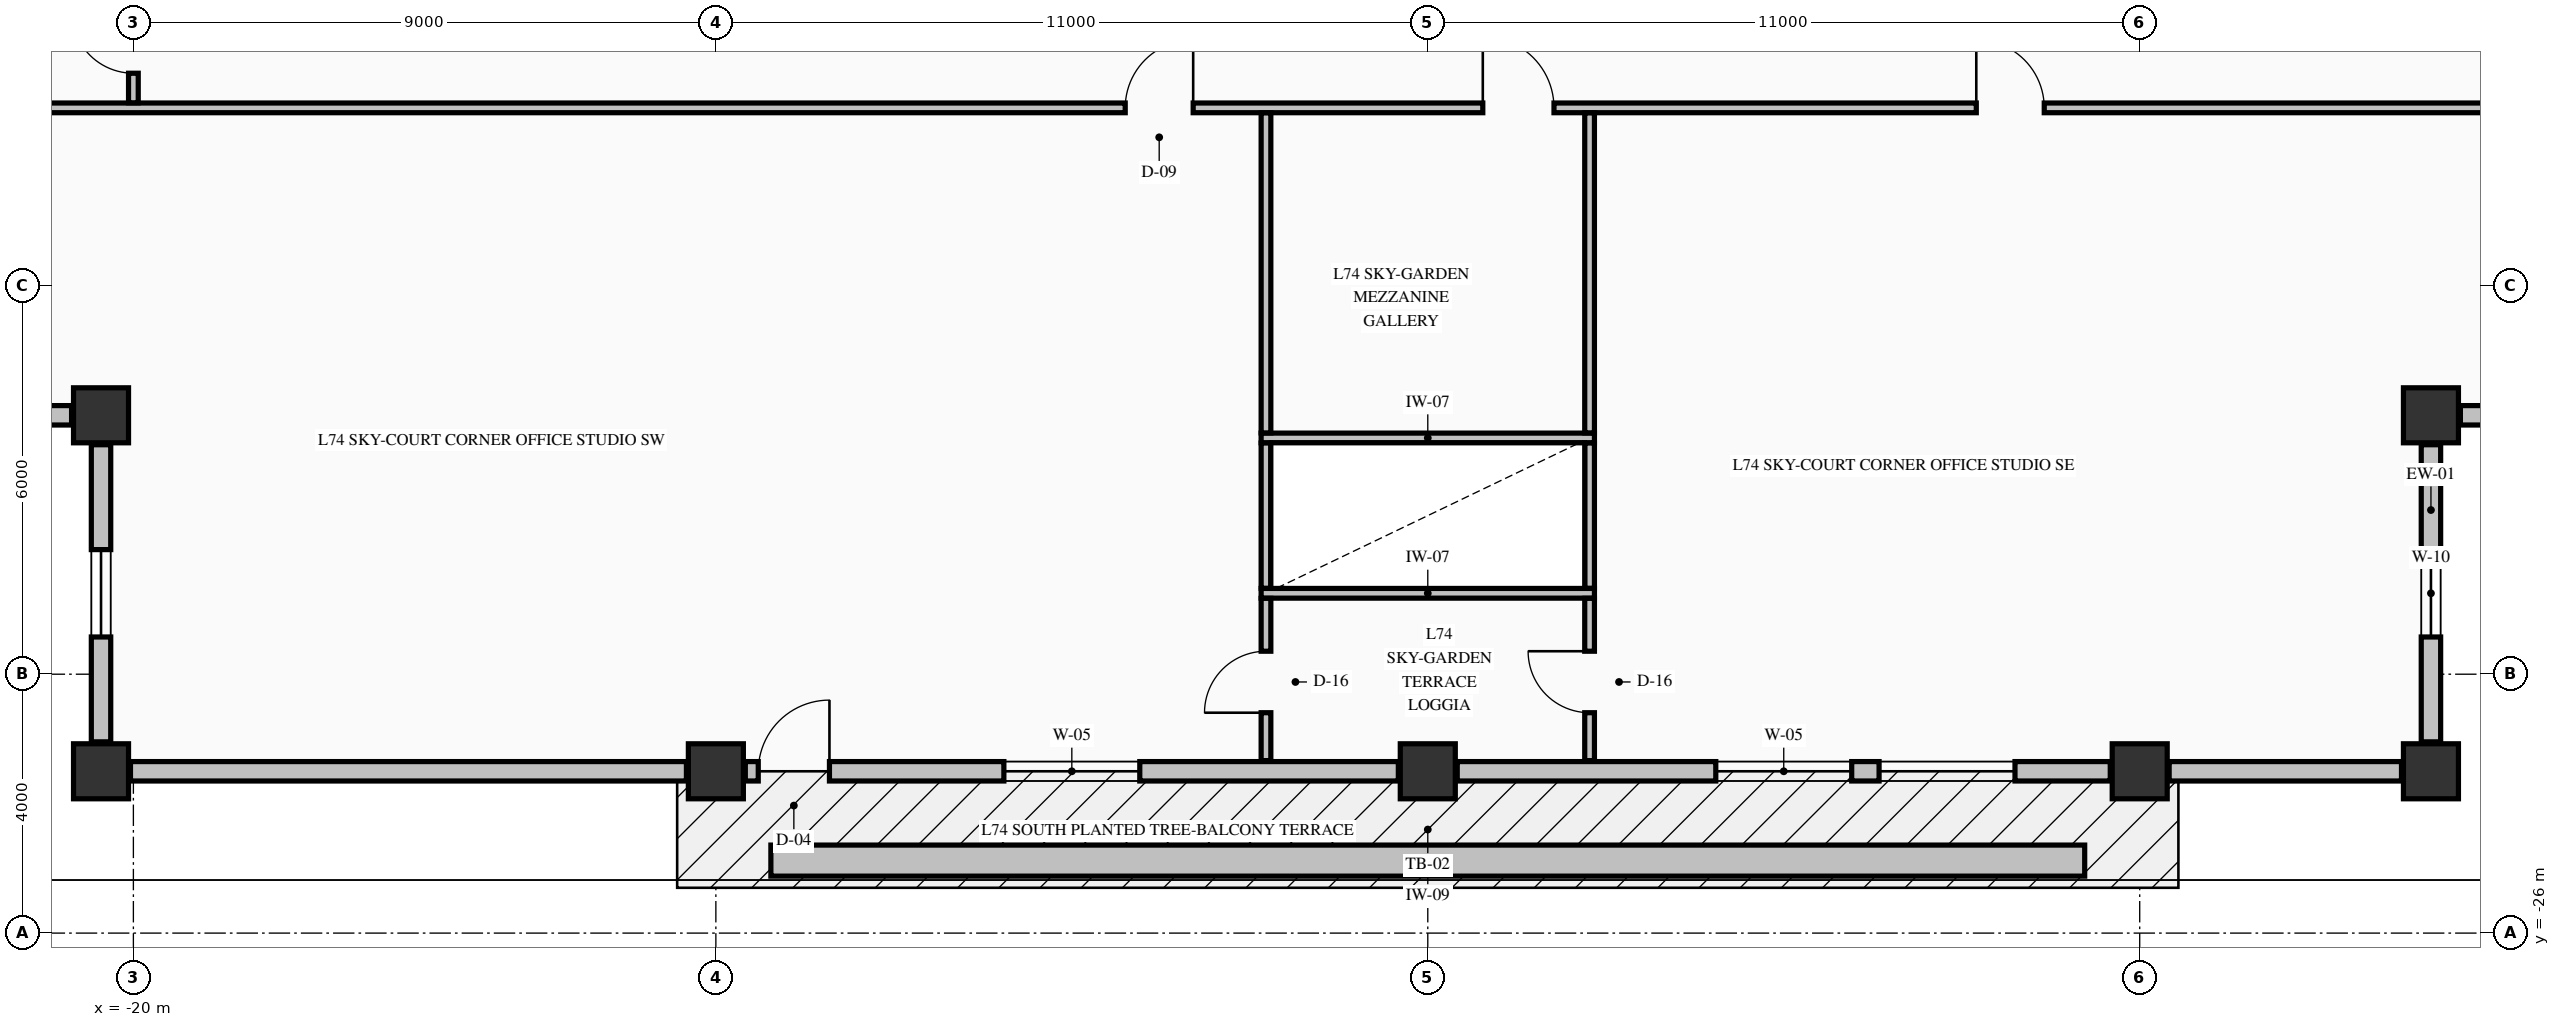
"""IFC4 building model, lengths in metres.
Left out: names, types, materials, properties, quantities, classifications, styles, units other than length and angle.
Written with IfcOpenShell. Run it as: python <this file> out.ifc"""

import sys

from ifc_helpers import new_model, si_unit, direction, frame, frame_2d, origin, origin_2d, place, context, subcontext, project, spatial, rectangle, extrude, element, fill, save


model = new_model("IFC4")
c1 = context("Model", 3, precision=1e-05, world=origin(), true_north=direction((0.0, 1.0)))
c2 = subcontext(c1, "Body", "Model", "MODEL_VIEW")
j1 = project(units=[si_unit("LENGTHUNIT", "METRE"), si_unit("PLANEANGLEUNIT", "RADIAN")], contexts=[c1])
p1 = place(None, origin())
s1 = spatial("IfcSite", under=j1, at=p1, CompositionType="ELEMENT")
p2 = place(p1, origin())
s2 = spatial("IfcBuilding", under=s1, at=p2, CompositionType="ELEMENT")
p3 = place(p2, frame((0.0, 0.0, 278.06)))
s3 = spatial("IfcBuildingStorey", under=s2, at=p3, CompositionType="ELEMENT", Elevation=278.06)
for number, where, z_axis, x_axis in (
    (1, (-20.5, -23.5, -0.425), (0.0, 0.0, 1.0), (1.0, 0.0, 0.0)),
    (2, (-11.0, -23.5, -0.425), (0.0, 0.0, 1.0), (1.0, 0.0, 0.0)),
    (3, (0.0, -23.5, -0.425), (0.0, 0.0, 1.0), (1.0, 0.0, 0.0)),
    (4, (11.0, -23.5, -0.425), (0.0, 0.0, 1.0), (1.0, 0.0, 0.0)),
    (5, (15.5, -23.5, -0.425), (0.0, 0.0, 1.0), (1.0, 0.0, 0.0)),
    (6, (-20.5, -18.0, -0.425), (0.0, 0.0, 1.0), (1.0, 0.0, 0.0)),
    (7, (15.5, -18.0, -0.425), (0.0, 0.0, 1.0), (1.0, 0.0, 0.0)),
):
    element("IfcColumn", number, at=place(p3, frame(where, z_axis=z_axis, x_axis=x_axis)), inside=s3, PredefinedType="COLUMN", context=c2, shape_type="SweptSolid", body=[
        extrude(rectangle(XDim=0.85, YDim=0.85, at=origin_2d()), origin(), (0.0, 0.0, 1.0), 3.84),
    ])
p4 = place(p3, frame((15.5, -23.045, 0.0), z_axis=(0.0, 0.0, 1.0), x_axis=(0.0, 1.0, 0.0)))
e8 = element("IfcWall", 8, at=p4, inside=s3, PredefinedType="STANDARD", context=c2, shape_type="SweptSolid", body=[
    extrude(rectangle(XDim=4.59, YDim=0.3, at=frame_2d((2.295, 0.0))), origin(), (0.0, 0.0, 1.0), 2.807),
])
p5 = place(p4, frame((1.62, 0.0, 0.68)))
e9 = element("IfcOpeningElement", 9, at=p5, cuts=e8, PredefinedType="OPENING", context=c2, shape_type="SweptSolid", body=[
    extrude(rectangle(XDim=1.35, YDim=1.42, at=frame_2d((0.675, 0.71))), frame((0.0, 0.16, 0.0), z_axis=(0.0, -1.0, 0.0), x_axis=(1.0, 0.0, 0.0)), (0.0, 0.0, 1.0), 0.32),
])
p6 = place(p3, frame((15.955, -18.0, 0.0), z_axis=(0.0, 0.0, 1.0), x_axis=(1.0, 0.0, 0.0)))
e10 = element("IfcWall", 10, at=p6, inside=s3, PredefinedType="STANDARD", context=c2, shape_type="SweptSolid", body=[
    extrude(rectangle(XDim=4.59, YDim=0.3, at=frame_2d((2.295, 0.0))), origin(), (0.0, 0.0, 1.0), 2.807),
])
p7 = place(p6, frame((1.62, 0.0, 0.68)))
e11 = element("IfcOpeningElement", 11, at=p7, cuts=e10, PredefinedType="OPENING", context=c2, shape_type="SweptSolid", body=[
    extrude(rectangle(XDim=1.35, YDim=1.42, at=frame_2d((0.675, 0.71))), frame((0.0, 0.16, 0.0), z_axis=(0.0, -1.0, 0.0), x_axis=(1.0, 0.0, 0.0)), (0.0, 0.0, 1.0), 0.32),
])
p8 = place(p3, frame((-25.545, -18.0, 0.0), z_axis=(0.0, 0.0, 1.0), x_axis=(1.0, 0.0, 0.0)))
e12 = element("IfcWall", 12, at=p8, inside=s3, PredefinedType="STANDARD", context=c2, shape_type="SweptSolid", body=[
    extrude(rectangle(XDim=4.59, YDim=0.3, at=frame_2d((2.295, 0.0))), origin(), (0.0, 0.0, 1.0), 2.807),
])
p9 = place(p8, frame((1.62, 0.0, 0.68)))
e13 = element("IfcOpeningElement", 13, at=p9, cuts=e12, PredefinedType="OPENING", context=c2, shape_type="SweptSolid", body=[
    extrude(rectangle(XDim=1.35, YDim=1.42, at=frame_2d((0.675, 0.71))), frame((0.0, 0.16, 0.0), z_axis=(0.0, -1.0, 0.0), x_axis=(1.0, 0.0, 0.0)), (0.0, 0.0, 1.0), 0.32),
])
p10 = place(p3, frame((-20.5, -18.455, 0.0), z_axis=(0.0, 0.0, 1.0), x_axis=(0.0, -1.0, 0.0)))
e14 = element("IfcWall", 14, at=p10, inside=s3, PredefinedType="STANDARD", context=c2, shape_type="SweptSolid", body=[
    extrude(rectangle(XDim=4.59, YDim=0.3, at=frame_2d((2.295, 0.0))), origin(), (0.0, 0.0, 1.0), 2.807),
])
p11 = place(p10, frame((1.62, 0.0, 0.68)))
e15 = element("IfcOpeningElement", 15, at=p11, cuts=e14, PredefinedType="OPENING", context=c2, shape_type="SweptSolid", body=[
    extrude(rectangle(XDim=1.35, YDim=1.42, at=frame_2d((0.675, 0.71))), frame((0.0, 0.16, 0.0), z_axis=(0.0, -1.0, 0.0), x_axis=(1.0, 0.0, 0.0)), (0.0, 0.0, 1.0), 0.32),
])
p12 = place(p3, frame((-20.045, -23.5, 0.0), z_axis=(0.0, 0.0, 1.0), x_axis=(1.0, 0.0, 0.0)))
e16 = element("IfcWall", 16, at=p12, inside=s3, PredefinedType="STANDARD", context=c2, shape_type="SweptSolid", body=[
    extrude(rectangle(XDim=8.59, YDim=0.3, at=frame_2d((4.295, 0.0))), origin(), (0.0, 0.0, 1.0), 2.807),
])
p13 = place(p3, frame((-10.545, -23.5, 0.0), z_axis=(0.0, 0.0, 1.0), x_axis=(1.0, 0.0, 0.0)))
e17 = element("IfcWall", 17, at=p13, inside=s3, PredefinedType="STANDARD", context=c2, shape_type="SweptSolid", body=[
    extrude(rectangle(XDim=10.09, YDim=0.3, at=frame_2d((5.045, 0.0))), origin(), (0.0, 0.0, 1.0), 2.807),
])
p14 = place(p13, frame((0.2, 0.0, 0.0)))
e18 = element("IfcOpeningElement", 18, at=p14, cuts=e17, PredefinedType="OPENING", context=c2, shape_type="SweptSolid", body=[
    extrude(rectangle(XDim=1.1, YDim=2.15, at=frame_2d((0.55, 1.075))), frame((0.0, 0.16, 0.0), z_axis=(0.0, -1.0, 0.0), x_axis=(1.0, 0.0, 0.0)), (0.0, 0.0, 1.0), 0.32),
])
p15 = place(p13, frame((3.995, 0.0, 0.7)))
e19 = element("IfcOpeningElement", 19, at=p15, cuts=e17, PredefinedType="OPENING", context=c2, shape_type="SweptSolid", body=[
    extrude(rectangle(XDim=2.1, YDim=1.5, at=frame_2d((1.05, 0.75))), frame((0.0, 0.16, 0.0), z_axis=(0.0, -1.0, 0.0), x_axis=(1.0, 0.0, 0.0)), (0.0, 0.0, 1.0), 0.32),
])
p16 = place(p3, frame((0.455, -23.5, 0.0), z_axis=(0.0, 0.0, 1.0), x_axis=(1.0, 0.0, 0.0)))
e20 = element("IfcWall", 20, at=p16, inside=s3, PredefinedType="STANDARD", context=c2, shape_type="SweptSolid", body=[
    extrude(rectangle(XDim=10.09, YDim=0.3, at=frame_2d((5.045, 0.0))), origin(), (0.0, 0.0, 1.0), 2.807),
])
p17 = place(p16, frame((3.995, 0.0, 0.7)))
e21 = element("IfcOpeningElement", 21, at=p17, cuts=e20, PredefinedType="OPENING", context=c2, shape_type="SweptSolid", body=[
    extrude(rectangle(XDim=2.1, YDim=1.5, at=frame_2d((1.05, 0.75))), frame((0.0, 0.16, 0.0), z_axis=(0.0, -1.0, 0.0), x_axis=(1.0, 0.0, 0.0)), (0.0, 0.0, 1.0), 0.32),
])
p18 = place(p16, frame((6.518, 0.0, 0.7)))
e22 = element("IfcOpeningElement", 22, at=p18, cuts=e20, PredefinedType="OPENING", context=c2, shape_type="SweptSolid", body=[
    extrude(rectangle(XDim=2.1, YDim=1.5, at=frame_2d((1.05, 0.75))), frame((0.0, 0.16, 0.0), z_axis=(0.0, -1.0, 0.0), x_axis=(1.0, 0.0, 0.0)), (0.0, 0.0, 1.0), 0.32),
])
p19 = place(p3, frame((11.455, -23.5, 0.0), z_axis=(0.0, 0.0, 1.0), x_axis=(1.0, 0.0, 0.0)))
e23 = element("IfcWall", 23, at=p19, inside=s3, PredefinedType="STANDARD", context=c2, shape_type="SweptSolid", body=[
    extrude(rectangle(XDim=3.59, YDim=0.3, at=frame_2d((1.795, 0.0))), origin(), (0.0, 0.0, 1.0), 2.807),
])
for number, where, z_axis, x_axis in (
    (24, (-2.575, -20.75, 0.0), (0.0, 0.0, 1.0), (1.0, 0.0, 0.0)),
    (25, (-2.575, -18.35, 0.0), (0.0, 0.0, 1.0), (1.0, 0.0, 0.0)),
):
    element("IfcWall", number, at=place(p3, frame(where, z_axis=z_axis, x_axis=x_axis)), inside=s3, PredefinedType="PARTITIONING", context=c2, shape_type="SweptSolid", body=[
        extrude(rectangle(XDim=5.15, YDim=0.15, at=frame_2d((2.575, 0.0))), origin(), (0.0, 0.0, 1.0), 3.415),
    ])
p20 = place(p3, frame((-25.835, -13.25, 0.0), z_axis=(0.0, 0.0, 1.0), x_axis=(1.0, 0.0, 0.0)))
e26 = element("IfcWall", 26, at=p20, inside=s3, PredefinedType="PARTITIONING", context=c2, shape_type="SweptSolid", body=[
    extrude(rectangle(XDim=45.91, YDim=0.15, at=frame_2d((22.955, 0.0))), origin(), (0.0, 0.0, 1.0), 3.415),
])
p21 = place(p20, frame((26.685, 0.0, 0.0)))
e27 = element("IfcOpeningElement", 27, at=p21, cuts=e26, PredefinedType="OPENING", context=c2, shape_type="SweptSolid", body=[
    extrude(rectangle(XDim=1.1, YDim=2.15, at=frame_2d((0.55, 1.075))), frame((0.0, 0.085, 0.0), z_axis=(0.0, -1.0, 0.0), x_axis=(1.0, 0.0, 0.0)), (0.0, 0.0, 1.0), 0.17),
])
p22 = place(p20, frame((21.16, 0.0, 0.0)))
e28 = element("IfcOpeningElement", 28, at=p22, cuts=e26, PredefinedType="OPENING", context=c2, shape_type="SweptSolid", body=[
    extrude(rectangle(XDim=1.05, YDim=2.15, at=frame_2d((0.525, 1.075))), frame((0.0, 0.085, 0.0), z_axis=(0.0, -1.0, 0.0), x_axis=(1.0, 0.0, 0.0)), (0.0, 0.0, 1.0), 0.17),
])
p23 = place(p20, frame((34.31, 0.0, 0.0)))
e29 = element("IfcOpeningElement", 29, at=p23, cuts=e26, PredefinedType="OPENING", context=c2, shape_type="SweptSolid", body=[
    extrude(rectangle(XDim=1.05, YDim=2.15, at=frame_2d((0.525, 1.075))), frame((0.0, 0.085, 0.0), z_axis=(0.0, -1.0, 0.0), x_axis=(1.0, 0.0, 0.0)), (0.0, 0.0, 1.0), 0.17),
])
p24 = place(p3, frame((-20.0, -13.172, 0.0), z_axis=(0.0, 0.0, 1.0), x_axis=(0.0, 1.0, 0.0)))
e30 = element("IfcWall", 30, at=p24, inside=s3, PredefinedType="PARTITIONING", context=c2, shape_type="SweptSolid", body=[
    extrude(rectangle(XDim=2.716, YDim=0.15, at=frame_2d((1.358, 0.0))), origin(), (0.0, 0.0, 1.0), 3.415),
])
p25 = place(p24, frame((0.457, 0.0, 0.0)))
e31 = element("IfcOpeningElement", 31, at=p25, cuts=e30, PredefinedType="OPENING", context=c2, shape_type="SweptSolid", body=[
    extrude(rectangle(XDim=0.95, YDim=2.15, at=frame_2d((0.475, 1.075))), frame((0.0, 0.085, 0.0), z_axis=(0.0, -1.0, 0.0), x_axis=(1.0, 0.0, 0.0)), (0.0, 0.0, 1.0), 0.17),
])
p26 = place(p3, frame((-2.5, -23.335, 0.0), z_axis=(0.0, 0.0, 1.0), x_axis=(0.0, 1.0, 0.0)))
e32 = element("IfcWall", 32, at=p26, inside=s3, PredefinedType="PARTITIONING", context=c2, shape_type="SweptSolid", body=[
    extrude(rectangle(XDim=2.507, YDim=0.15, at=frame_2d((1.253, 0.0))), origin(), (0.0, 0.0, 1.0), 3.415),
])
p27 = place(p26, frame((0.74, 0.0, 0.0)))
e33 = element("IfcOpeningElement", 33, at=p27, cuts=e32, PredefinedType="OPENING", context=c2, shape_type="SweptSolid", body=[
    extrude(rectangle(XDim=0.95, YDim=2.15, at=frame_2d((0.475, 1.075))), frame((0.0, 0.085, 0.0), z_axis=(0.0, -1.0, 0.0), x_axis=(1.0, 0.0, 0.0)), (0.0, 0.0, 1.0), 0.17),
])
p28 = place(p3, frame((-2.5, -20.672, 0.0), z_axis=(0.0, 0.0, 1.0), x_axis=(0.0, 1.0, 0.0)))
e34 = element("IfcWall", 34, at=p28, inside=s3, PredefinedType="PARTITIONING", context=c2, shape_type="SweptSolid", body=[
    extrude(rectangle(XDim=2.244, YDim=0.15, at=frame_2d((1.122, 0.0))), origin(), (0.0, 0.0, 1.0), 3.415),
])
p29 = place(p3, frame((-2.5, -18.272, 0.0), z_axis=(0.0, 0.0, 1.0), x_axis=(0.0, 1.0, 0.0)))
e35 = element("IfcWall", 35, at=p29, inside=s3, PredefinedType="PARTITIONING", context=c2, shape_type="SweptSolid", body=[
    extrude(rectangle(XDim=4.944, YDim=0.15, at=frame_2d((2.472, 0.0))), origin(), (0.0, 0.0, 1.0), 3.415),
])
p30 = place(p3, frame((2.5, -23.335, 0.0), z_axis=(0.0, 0.0, 1.0), x_axis=(0.0, 1.0, 0.0)))
e36 = element("IfcWall", 36, at=p30, inside=s3, PredefinedType="PARTITIONING", context=c2, shape_type="SweptSolid", body=[
    extrude(rectangle(XDim=2.507, YDim=0.15, at=frame_2d((1.253, 0.0))), origin(), (0.0, 0.0, 1.0), 3.415),
])
p31 = place(p30, frame((0.74, 0.0, 0.0)))
e37 = element("IfcOpeningElement", 37, at=p31, cuts=e36, PredefinedType="OPENING", context=c2, shape_type="SweptSolid", body=[
    extrude(rectangle(XDim=0.95, YDim=2.15, at=frame_2d((0.475, 1.075))), frame((0.0, 0.085, 0.0), z_axis=(0.0, -1.0, 0.0), x_axis=(1.0, 0.0, 0.0)), (0.0, 0.0, 1.0), 0.17),
])
p32 = place(p3, frame((2.5, -20.672, 0.0), z_axis=(0.0, 0.0, 1.0), x_axis=(0.0, 1.0, 0.0)))
e38 = element("IfcWall", 38, at=p32, inside=s3, PredefinedType="PARTITIONING", context=c2, shape_type="SweptSolid", body=[
    extrude(rectangle(XDim=2.244, YDim=0.15, at=frame_2d((1.122, 0.0))), origin(), (0.0, 0.0, 1.0), 3.415),
])
p33 = place(p3, frame((2.5, -18.272, 0.0), z_axis=(0.0, 0.0, 1.0), x_axis=(0.0, 1.0, 0.0)))
e39 = element("IfcWall", 39, at=p33, inside=s3, PredefinedType="PARTITIONING", context=c2, shape_type="SweptSolid", body=[
    extrude(rectangle(XDim=4.944, YDim=0.15, at=frame_2d((2.472, 0.0))), origin(), (0.0, 0.0, 1.0), 3.415),
])
p34 = place(p3, frame((-10.15, -24.88, -0.04), z_axis=(0.0, 0.0, 1.0), x_axis=(1.0, 0.0, 0.0)))
e40 = element("IfcWall", 40, at=p34, inside=s3, PredefinedType="PARAPET", context=c2, shape_type="SweptSolid", body=[
    extrude(rectangle(XDim=20.3, YDim=0.48, at=frame_2d((10.15, 0.0))), origin(), (0.0, 0.0, 1.0), 0.52),
])
p35 = place(p5, origin())
e41 = element("IfcWindow", 41, at=p35, inside=s3, PartitioningType="SINGLE_PANEL", PredefinedType="WINDOW", context=c2, shape_type="SweptSolid", body=[
    extrude(rectangle(XDim=1.35, YDim=1.42, at=frame_2d((0.675, 0.71))), frame((0.0, 0.03, 0.0), z_axis=(0.0, -1.0, 0.0), x_axis=(1.0, 0.0, 0.0)), (0.0, 0.0, 1.0), 0.06),
])
fill(e9, e41)
p36 = place(p11, origin())
e42 = element("IfcWindow", 42, at=p36, inside=s3, PartitioningType="SINGLE_PANEL", PredefinedType="WINDOW", context=c2, shape_type="SweptSolid", body=[
    extrude(rectangle(XDim=1.35, YDim=1.42, at=frame_2d((0.675, 0.71))), frame((0.0, 0.03, 0.0), z_axis=(0.0, -1.0, 0.0), x_axis=(1.0, 0.0, 0.0)), (0.0, 0.0, 1.0), 0.06),
])
fill(e15, e42)
p37 = place(p14, origin())
e43 = element("IfcDoor", 43, at=p37, inside=s3, OperationType="SINGLE_SWING_RIGHT", PredefinedType="DOOR", context=c2, shape_type="SweptSolid", body=[
    extrude(rectangle(XDim=1.1, YDim=2.15, at=frame_2d((0.55, 1.075))), frame((0.0, 0.025, 0.0), z_axis=(0.0, -1.0, 0.0), x_axis=(1.0, 0.0, 0.0)), (0.0, 0.0, 1.0), 0.05),
])
fill(e18, e43)
p38 = place(p15, origin())
e44 = element("IfcWindow", 44, at=p38, inside=s3, PartitioningType="SINGLE_PANEL", PredefinedType="WINDOW", context=c2, shape_type="SweptSolid", body=[
    extrude(rectangle(XDim=2.1, YDim=1.5, at=frame_2d((1.05, 0.75))), frame((0.0, 0.03, 0.0), z_axis=(0.0, -1.0, 0.0), x_axis=(1.0, 0.0, 0.0)), (0.0, 0.0, 1.0), 0.06),
])
fill(e19, e44)
p39 = place(p17, origin())
e45 = element("IfcWindow", 45, at=p39, inside=s3, PartitioningType="SINGLE_PANEL", PredefinedType="WINDOW", context=c2, shape_type="SweptSolid", body=[
    extrude(rectangle(XDim=2.1, YDim=1.5, at=frame_2d((1.05, 0.75))), frame((0.0, 0.03, 0.0), z_axis=(0.0, -1.0, 0.0), x_axis=(1.0, 0.0, 0.0)), (0.0, 0.0, 1.0), 0.06),
])
fill(e21, e45)
p40 = place(p18, origin())
e46 = element("IfcWindow", 46, at=p40, inside=s3, PartitioningType="SINGLE_PANEL", PredefinedType="WINDOW", context=c2, shape_type="SweptSolid", body=[
    extrude(rectangle(XDim=2.1, YDim=1.5, at=frame_2d((1.05, 0.75))), frame((0.0, 0.03, 0.0), z_axis=(0.0, -1.0, 0.0), x_axis=(1.0, 0.0, 0.0)), (0.0, 0.0, 1.0), 0.06),
])
fill(e22, e46)
p41 = place(p27, origin())
e47 = element("IfcDoor", 47, at=p41, inside=s3, OperationType="SINGLE_SWING_LEFT", PredefinedType="DOOR", context=c2, shape_type="SweptSolid", body=[
    extrude(rectangle(XDim=0.95, YDim=2.15, at=frame_2d((0.475, 1.075))), frame((0.0, 0.025, 0.0), z_axis=(0.0, -1.0, 0.0), x_axis=(1.0, 0.0, 0.0)), (0.0, 0.0, 1.0), 0.05),
])
fill(e33, e47)
p42 = place(p31, origin())
e48 = element("IfcDoor", 48, at=p42, inside=s3, OperationType="SINGLE_SWING_RIGHT", PredefinedType="DOOR", context=c2, shape_type="SweptSolid", body=[
    extrude(rectangle(XDim=0.95, YDim=2.15, at=frame_2d((0.475, 1.075))), frame((0.0, 0.025, 0.0), z_axis=(0.0, -1.0, 0.0), x_axis=(1.0, 0.0, 0.0)), (0.0, 0.0, 1.0), 0.05),
])
fill(e37, e48)
p43 = place(p21, origin())
e49 = element("IfcDoor", 49, at=p43, inside=s3, OperationType="SINGLE_SWING_LEFT", PredefinedType="DOOR", context=c2, shape_type="SweptSolid", body=[
    extrude(rectangle(XDim=1.1, YDim=2.15, at=frame_2d((0.55, 1.075))), frame((0.0, 0.025, 0.0), z_axis=(0.0, -1.0, 0.0), x_axis=(1.0, 0.0, 0.0)), (0.0, 0.0, 1.0), 0.05),
])
fill(e27, e49)
p44 = place(p22, origin())
e50 = element("IfcDoor", 50, at=p44, inside=s3, OperationType="SINGLE_SWING_RIGHT", PredefinedType="DOOR", context=c2, shape_type="SweptSolid", body=[
    extrude(rectangle(XDim=1.05, YDim=2.15, at=frame_2d((0.525, 1.075))), frame((0.0, 0.025, 0.0), z_axis=(0.0, -1.0, 0.0), x_axis=(1.0, 0.0, 0.0)), (0.0, 0.0, 1.0), 0.05),
])
fill(e28, e50)
p45 = place(p23, origin())
e51 = element("IfcDoor", 51, at=p45, inside=s3, OperationType="SINGLE_SWING_LEFT", PredefinedType="DOOR", context=c2, shape_type="SweptSolid", body=[
    extrude(rectangle(XDim=1.05, YDim=2.15, at=frame_2d((0.525, 1.075))), frame((0.0, 0.025, 0.0), z_axis=(0.0, -1.0, 0.0), x_axis=(1.0, 0.0, 0.0)), (0.0, 0.0, 1.0), 0.05),
])
fill(e29, e51)
p46 = place(p25, origin())
e52 = element("IfcDoor", 52, at=p46, inside=s3, OperationType="SINGLE_SWING_RIGHT", PredefinedType="DOOR", context=c2, shape_type="SweptSolid", body=[
    extrude(rectangle(XDim=0.95, YDim=2.15, at=frame_2d((0.475, 1.075))), frame((0.0, 0.025, 0.0), z_axis=(0.0, -1.0, 0.0), x_axis=(1.0, 0.0, 0.0)), (0.0, 0.0, 1.0), 0.05),
])
fill(e31, e52)
save(model, sys.argv[1])
